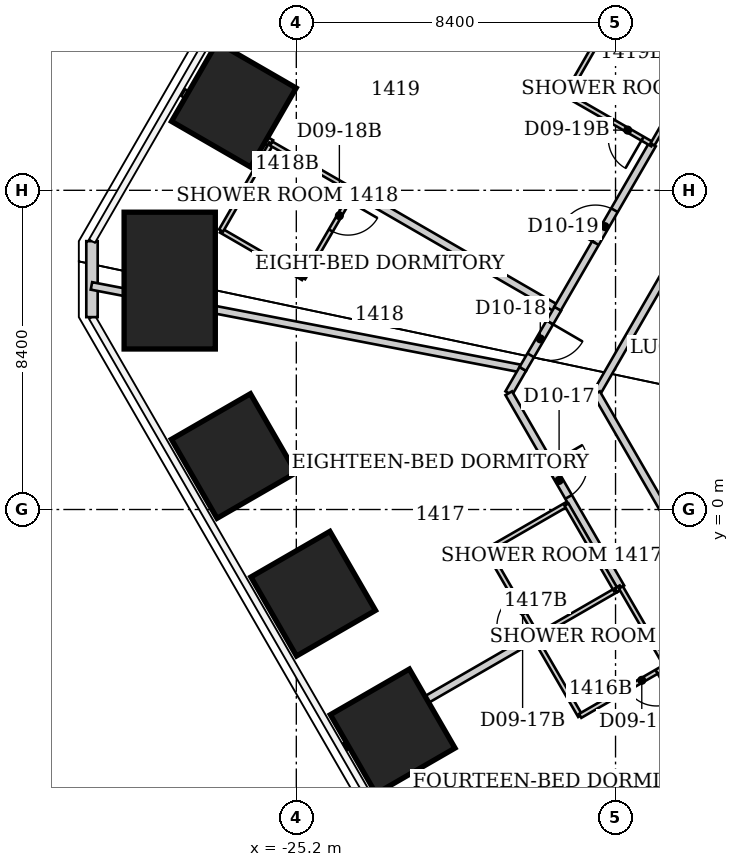
"""IFC4 building model, lengths in metres.
Left out: names, types, materials, properties, quantities, classifications, styles, units other than length and angle.
Written with IfcOpenShell. Run it as: python <this file> out.ifc"""

import sys

from ifc_helpers import new_model, si_unit, direction, frame, frame_2d, origin, origin_2d, place, context, subcontext, project, spatial, rectangle, extrude, element, fill, save


model = new_model("IFC4")
c1 = context("Model", 3, precision=1e-05, world=origin(), true_north=direction((0.0, 1.0)))
c2 = subcontext(c1, "Body", "Model", "MODEL_VIEW")
j1 = project(units=[si_unit("LENGTHUNIT", "METRE"), si_unit("PLANEANGLEUNIT", "RADIAN")], contexts=[c1])
p1 = place(None, origin())
s1 = spatial("IfcSite", under=j1, at=p1, CompositionType="ELEMENT")
p2 = place(p1, origin())
s2 = spatial("IfcBuilding", under=s1, at=p2, CompositionType="ELEMENT")
p3 = place(p2, frame((0.0, 0.0, 61.0)))
s3 = spatial("IfcBuildingStorey", under=s2, at=p3, CompositionType="ELEMENT", Elevation=61.0)
p4 = place(p3, frame((-22.664, -5.839, 0.0), z_axis=(0.036915008746, 0.009501602251, 0.99927323675), x_axis=(-0.865363128074, -0.499798223787, 0.036720458449)))
e1 = element("IfcColumn", 1, at=p4, inside=s3, PredefinedType="COLUMN", context=c2, shape_type="SweptSolid", body=[
    extrude(rectangle(XDim=2.4, YDim=2.4, at=origin_2d()), origin(), (0.0, 0.0, 1.0), 3.803),
])
p5 = place(p3, frame((-24.756, -2.216, 0.0), z_axis=(0.040313871888, 0.003594867557, 0.999180598621), x_axis=(-0.865292276739, -0.499921607788, 0.036710514605)))
e2 = element("IfcColumn", 2, at=p5, inside=s3, PredefinedType="COLUMN", context=c2, shape_type="SweptSolid", body=[
    extrude(rectangle(XDim=2.4, YDim=2.4, at=origin_2d()), origin(), (0.0, 0.0, 1.0), 3.803),
])
p6 = place(p3, frame((-26.847, 1.407, 0.0), z_axis=(0.043710075164, -0.002310664766, 0.9990415858), x_axis=(-0.865223526362, -0.500041450944, 0.036698729792)))
e3 = element("IfcColumn", 3, at=p6, inside=s3, PredefinedType="COLUMN", context=c2, shape_type="SweptSolid", body=[
    extrude(rectangle(XDim=2.4, YDim=2.4, at=origin_2d()), origin(), (0.0, 0.0, 1.0), 3.804),
])
p7 = place(p3, frame((-28.531, 6.024, 0.0), z_axis=(0.046846312306, -0.009882646706, 0.998853220607), x_axis=(-0.998902095057, -0.000629521583, 0.04684237604)))
e4 = element("IfcColumn", 4, at=p7, inside=s3, PredefinedType="COLUMN", context=c2, shape_type="SweptSolid", body=[
    extrude(rectangle(XDim=2.4, YDim=3.6, at=origin_2d()), origin(), (0.0, 0.0, 1.0), 3.804),
])
p8 = place(p3, frame((-26.844, 10.653, 0.0), z_axis=(0.043127320452, -0.017071231012, 0.998923724467), x_axis=(-0.865394297081, 0.498985805563, 0.045889829227)))
e5 = element("IfcColumn", 5, at=p8, inside=s3, PredefinedType="COLUMN", context=c2, shape_type="SweptSolid", body=[
    extrude(rectangle(XDim=2.4, YDim=2.4, at=origin_2d()), origin(), (0.0, 0.0, 1.0), 3.804),
])
p9 = place(p3, frame((-30.576, 5.062, 0.0), z_axis=(0.0, 0.0, 1.0), x_axis=(0.0, 1.0, 0.0)))
e6 = element("IfcWall", 6, at=p9, inside=s3, PredefinedType="SOLIDWALL", context=c2, shape_type="SweptSolid", body=[
    extrude(rectangle(XDim=2.0, YDim=0.3, at=frame_2d((1.0, 0.0))), origin(), (0.0, 0.0, 1.0), 3.64),
])
p10 = place(p3, frame((-30.591, 5.884, 0.0), z_axis=(0.0, 0.0, 1.0), x_axis=(0.981983289605, -0.188967772219, 0.0)))
e7 = element("IfcWall", 7, at=p10, inside=s3, PredefinedType="PARTITIONING", context=c2, shape_type="SweptSolid", body=[
    extrude(rectangle(XDim=11.509, YDim=0.2, at=frame_2d((5.754, 0.0))), origin(), (0.0, 0.0, 1.0), 3.64),
])
p11 = place(p3, frame((-28.176, 10.97, 0.0), z_axis=(0.0, 0.0, 1.0), x_axis=(0.865563676017, -0.500798884543, 0.0)))
e8 = element("IfcWall", 8, at=p11, inside=s3, PredefinedType="PARTITIONING", context=c2, shape_type="SweptSolid", body=[
    extrude(rectangle(XDim=2.676, YDim=0.2, at=frame_2d((1.338, 0.0))), origin(), (0.0, 0.0, 1.0), 3.64),
])
p12 = place(p3, frame((-27.18, 7.34, 0.0), z_axis=(0.0, 0.0, 1.0), x_axis=(0.865508881864, -0.500893576935, 0.0)))
e9 = element("IfcWall", 9, at=p12, inside=s3, PredefinedType="PARTITIONING", context=c2, shape_type="SweptSolid", body=[
    extrude(rectangle(XDim=2.496, YDim=0.12, at=frame_2d((1.248, 0.0))), origin(), (0.0, 0.0, 1.0), 3.64),
])
p13 = place(p3, frame((-25.86, 9.63, 0.0), z_axis=(0.0, 0.0, 1.0), x_axis=(-0.499378545839, -0.866383903334, 0.0)))
e10 = element("IfcWall", 10, at=p13, inside=s3, PredefinedType="PARTITIONING", context=c2, shape_type="SweptSolid", body=[
    extrude(rectangle(XDim=2.643, YDim=0.12, at=frame_2d((1.321, 0.0))), origin(), (0.0, 0.0, 1.0), 3.64),
])
p14 = place(p3, frame((-25.86, 9.63, 0.0), z_axis=(0.0, 0.0, 1.0), x_axis=(0.86653430447, -0.499117520406, 0.0)))
e11 = element("IfcWall", 11, at=p14, inside=s3, PredefinedType="PARTITIONING", context=c2, shape_type="SweptSolid", body=[
    extrude(rectangle(XDim=2.504, YDim=0.12, at=frame_2d((1.252, 0.0))), origin(), (0.0, 0.0, 1.0), 3.64),
])
p15 = place(p3, frame((-25.02, 6.09, 0.0), z_axis=(0.0, 0.0, 1.0), x_axis=(0.502282305835, 0.864703697948, 0.0)))
e12 = element("IfcWall", 12, at=p15, inside=s3, PredefinedType="PARTITIONING", context=c2, shape_type="SweptSolid", body=[
    extrude(rectangle(XDim=2.648, YDim=0.12, at=frame_2d((1.324, 0.0))), origin(), (0.0, 0.0, 1.0), 3.64),
])
p16 = place(p15, frame((1.448, 0.0, 0.0)))
e13 = element("IfcOpeningElement", 13, at=p16, cuts=e12, PredefinedType="OPENING", context=c2, shape_type="SweptSolid", body=[
    extrude(rectangle(XDim=0.9, YDim=2.03, at=frame_2d((0.45, 1.015))), frame((0.0, 0.06, 0.0), z_axis=(0.0, -1.0, 0.0), x_axis=(1.0, 0.0, 0.0)), (0.0, 0.0, 1.0), 0.12),
])
p17 = place(p3, frame((-23.916, -6.24, 0.0), z_axis=(0.0, 0.0, 1.0), x_axis=(0.865919350456, 0.50018364478, 0.0)))
e14 = element("IfcWall", 14, at=p17, inside=s3, PredefinedType="PARTITIONING", context=c2, shape_type="SweptSolid", body=[
    extrude(rectangle(XDim=5.758, YDim=0.2, at=frame_2d((2.879, 0.0))), origin(), (0.0, 0.0, 1.0), 3.64),
])
p18 = place(p3, frame((-23.69, 8.38, 0.0), z_axis=(0.0, 0.0, 1.0), x_axis=(0.865658018331, -0.500635791068, 0.0)))
e15 = element("IfcWall", 15, at=p18, inside=s3, PredefinedType="PARTITIONING", context=c2, shape_type="SweptSolid", body=[
    extrude(rectangle(XDim=6.177, YDim=0.2, at=frame_2d((3.088, 0.0))), origin(), (0.0, 0.0, 1.0), 3.64),
])
p19 = place(p3, frame((-20.17, -1.07, 0.0), z_axis=(0.0, 0.0, 1.0), x_axis=(0.500291685314, -0.865856933682, 0.0)))
e16 = element("IfcWall", 16, at=p19, inside=s3, PredefinedType="PARTITIONING", context=c2, shape_type="SweptSolid", body=[
    extrude(rectangle(XDim=2.599, YDim=0.12, at=frame_2d((1.299, 0.0))), origin(), (0.0, 0.0, 1.0), 3.64),
])
p20 = place(p19, frame((1.399, 0.0, 0.0)))
e17 = element("IfcOpeningElement", 17, at=p20, cuts=e16, PredefinedType="OPENING", context=c2, shape_type="SweptSolid", body=[
    extrude(rectangle(XDim=0.9, YDim=2.03, at=frame_2d((0.45, 1.015))), frame((0.0, 0.06, 0.0), z_axis=(0.0, -1.0, 0.0), x_axis=(1.0, 0.0, 0.0)), (0.0, 0.0, 1.0), 0.12),
])
p21 = place(p3, frame((-19.61, 3.06, 0.0), z_axis=(0.0, 0.0, 1.0), x_axis=(0.50068472101, 0.865629718844, 0.0)))
e18 = element("IfcWall", 18, at=p21, inside=s3, PredefinedType="PARTITIONING", context=c2, shape_type="SweptSolid", body=[
    extrude(rectangle(XDim=0.739, YDim=0.2, at=frame_2d((0.37, 0.0))), origin(), (0.0, 0.0, 1.0), 3.64),
])
p22 = place(p3, frame((-19.61, 3.06, 0.0), z_axis=(0.0, 0.0, 1.0), x_axis=(0.499983910424, -0.866034692906, 0.0)))
e19 = element("IfcWall", 19, at=p22, inside=s3, PredefinedType="PARTITIONING", context=c2, shape_type="SweptSolid", body=[
    extrude(rectangle(XDim=5.901, YDim=0.2, at=frame_2d((2.95, 0.0))), origin(), (0.0, 0.0, 1.0), 3.64),
])
p23 = place(p22, frame((2.15, 0.0, 0.0)))
e20 = element("IfcOpeningElement", 20, at=p23, cuts=e19, PredefinedType="OPENING", context=c2, shape_type="SweptSolid", body=[
    extrude(rectangle(XDim=1.0, YDim=2.13, at=frame_2d((0.5, 1.065))), frame((0.0, 0.1, 0.0), z_axis=(0.0, -1.0, 0.0), x_axis=(1.0, 0.0, 0.0)), (0.0, 0.0, 1.0), 0.2),
])
p24 = place(p3, frame((-18.93, -3.36, 0.0), z_axis=(0.0, 0.0, 1.0), x_axis=(0.501547039172, -0.865130376012, 0.0)))
e21 = element("IfcWall", 21, at=p24, inside=s3, PredefinedType="PARTITIONING", context=c2, shape_type="SweptSolid", body=[
    extrude(rectangle(XDim=2.393, YDim=0.12, at=frame_2d((1.196, 0.0))), origin(), (0.0, 0.0, 1.0), 3.64),
])
p25 = place(p3, frame((-18.868, -3.324, 0.0), z_axis=(0.0, 0.0, 1.0), x_axis=(0.866133109688, 0.499813401482, 0.0)))
e22 = element("IfcWall", 22, at=p25, inside=s3, PredefinedType="PARTITIONING", context=c2, shape_type="SweptSolid", body=[
    extrude(rectangle(XDim=2.401, YDim=0.12, at=frame_2d((1.201, 0.0))), origin(), (0.0, 0.0, 1.0), 3.64),
])
p26 = place(p3, frame((-18.33, 5.28, 0.0), z_axis=(0.0, 0.0, 1.0), x_axis=(0.500685921526, 0.865629024459, 0.0)))
e23 = element("IfcWall", 23, at=p26, inside=s3, PredefinedType="PARTITIONING", context=c2, shape_type="SweptSolid", body=[
    extrude(rectangle(XDim=5.0, YDim=0.2, at=frame_2d((2.5, 0.0))), origin(), (0.0, 0.0, 1.0), 3.64),
])
p27 = place(p26, frame((2.0, 0.0, 0.0)))
e24 = element("IfcOpeningElement", 24, at=p27, cuts=e23, PredefinedType="OPENING", context=c2, shape_type="SweptSolid", body=[
    extrude(rectangle(XDim=1.0, YDim=2.13, at=frame_2d((0.5, 1.065))), frame((0.0, 0.1, 0.0), z_axis=(0.0, -1.0, 0.0), x_axis=(1.0, 0.0, 0.0)), (0.0, 0.0, 1.0), 0.2),
])
p28 = place(p3, frame((-18.32, 5.28, 0.0), z_axis=(0.0, 0.0, 1.0), x_axis=(-0.503140236709, -0.864204780249, 0.0)))
e25 = element("IfcWall", 25, at=p28, inside=s3, PredefinedType="PARTITIONING", context=c2, shape_type="SweptSolid", body=[
    extrude(rectangle(XDim=1.828, YDim=0.2, at=frame_2d((0.914, 0.0))), origin(), (0.0, 0.0, 1.0), 3.64),
])
p29 = place(p28, frame((0.414, 0.0, 0.0)))
e26 = element("IfcOpeningElement", 26, at=p29, cuts=e25, PredefinedType="OPENING", context=c2, shape_type="SweptSolid", body=[
    extrude(rectangle(XDim=1.0, YDim=2.13, at=frame_2d((0.5, 1.065))), frame((0.0, 0.1, 0.0), z_axis=(0.0, -1.0, 0.0), x_axis=(1.0, 0.0, 0.0)), (0.0, 0.0, 1.0), 0.2),
])
p30 = place(p3, frame((-18.09, 0.13, 0.0), z_axis=(0.0, 0.0, 1.0), x_axis=(-0.866177122335, -0.499737123639, 0.0)))
e27 = element("IfcWall", 27, at=p30, inside=s3, PredefinedType="PARTITIONING", context=c2, shape_type="SweptSolid", body=[
    extrude(rectangle(XDim=2.401, YDim=0.12, at=frame_2d((1.201, 0.0))), origin(), (0.0, 0.0, 1.0), 3.64),
])
p31 = place(p3, frame((-18.09, 10.91, 0.0), z_axis=(0.0, 0.0, 1.0), x_axis=(0.866856728041, -0.498557331759, 0.0)))
e28 = element("IfcWall", 28, at=p31, inside=s3, PredefinedType="PARTITIONING", context=c2, shape_type="SweptSolid", body=[
    extrude(rectangle(XDim=2.607, YDim=0.12, at=frame_2d((1.304, 0.0))), origin(), (0.0, 0.0, 1.0), 3.64),
])
p32 = place(p31, frame((1.407, 0.0, 0.0)))
e29 = element("IfcOpeningElement", 29, at=p32, cuts=e28, PredefinedType="OPENING", context=c2, shape_type="SweptSolid", body=[
    extrude(rectangle(XDim=0.9, YDim=2.03, at=frame_2d((0.45, 1.015))), frame((0.0, 0.06, 0.0), z_axis=(0.0, -1.0, 0.0), x_axis=(1.0, 0.0, 0.0)), (0.0, 0.0, 1.0), 0.12),
])
p33 = place(p3, frame((-17.73, -5.43, 0.0), z_axis=(0.0, 0.0, 1.0), x_axis=(0.866114241029, 0.499846097802, 0.0)))
e30 = element("IfcWall", 30, at=p33, inside=s3, PredefinedType="PARTITIONING", context=c2, shape_type="SweptSolid", body=[
    extrude(rectangle(XDim=2.621, YDim=0.12, at=frame_2d((1.311, 0.0))), origin(), (0.0, 0.0, 1.0), 2.878),
])
p34 = place(p33, frame((1.421, 0.0, 0.0)))
e31 = element("IfcOpeningElement", 31, at=p34, cuts=e30, PredefinedType="OPENING", context=c2, shape_type="SweptSolid", body=[
    extrude(rectangle(XDim=0.9, YDim=2.03, at=frame_2d((0.45, 1.015))), frame((0.0, 0.06, 0.0), z_axis=(0.0, -1.0, 0.0), x_axis=(1.0, 0.0, 0.0)), (0.0, 0.0, 1.0), 0.12),
])
p35 = place(p3, frame((-17.3, 3.06, 0.0), z_axis=(0.0, 0.0, 1.0), x_axis=(0.499704269421, 0.866196076603, 0.0)))
e32 = element("IfcWall", 32, at=p35, inside=s3, PredefinedType="PARTITIONING", context=c2, shape_type="SweptSolid", body=[
    extrude(rectangle(XDim=9.686, YDim=0.2, at=frame_2d((4.843, 0.0))), origin(), (0.0, 0.0, 1.0), 3.64),
])
p36 = place(p3, frame((-16.89, 13.0, 0.0), z_axis=(0.0, 0.0, 1.0), x_axis=(-0.497970509195, -0.867193964446, 0.0)))
e33 = element("IfcWall", 33, at=p36, inside=s3, PredefinedType="PARTITIONING", context=c2, shape_type="SweptSolid", body=[
    extrude(rectangle(XDim=2.41, YDim=0.12, at=frame_2d((1.205, 0.0))), origin(), (0.0, 0.0, 1.0), 3.64),
])
p37 = place(p3, frame((-16.79, -2.12, 0.0), z_axis=(0.0, 0.0, 1.0), x_axis=(-0.50025099007, 0.865880446098, 0.0)))
e34 = element("IfcWall", 34, at=p37, inside=s3, PredefinedType="PARTITIONING", context=c2, shape_type="SweptSolid", body=[
    extrude(rectangle(XDim=2.599, YDim=0.12, at=frame_2d((1.299, 0.0))), origin(), (0.0, 0.0, 1.0), 3.64),
])
p38 = place(p3, frame((-16.788, -2.124, 0.0), z_axis=(0.0, 0.0, 1.0), x_axis=(0.866405716731, 0.499340699338, 0.0)))
e35 = element("IfcWall", 35, at=p38, inside=s3, PredefinedType="PARTITIONING", context=c2, shape_type="SweptSolid", body=[
    extrude(rectangle(XDim=0.148, YDim=0.12, at=frame_2d((0.074, 0.0))), origin(), (0.0, 0.0, 1.0), 3.64),
])
p39 = place(p3, frame((-16.66, -2.05, 0.0), z_axis=(0.0, 0.0, 1.0), x_axis=(0.501502765098, -0.865156041763, 0.0)))
e36 = element("IfcWall", 36, at=p39, inside=s3, PredefinedType="PARTITIONING", context=c2, shape_type="SweptSolid", body=[
    extrude(rectangle(XDim=2.393, YDim=0.12, at=frame_2d((1.196, 0.0))), origin(), (0.0, 0.0, 1.0), 3.64),
])
p40 = place(p3, frame((-15.827, 9.608, 0.0), z_axis=(0.0, 0.0, 1.0), x_axis=(0.499737123639, 0.866177122335, 0.0)))
e37 = element("IfcWall", 37, at=p40, inside=s3, PredefinedType="PARTITIONING", context=c2, shape_type="SweptSolid", body=[
    extrude(rectangle(XDim=2.401, YDim=0.12, at=frame_2d((1.201, 0.0))), origin(), (0.0, 0.0, 1.0), 3.64),
])
p41 = place(p3, frame((-11.16, -7.57, 0.0), z_axis=(0.0, 0.0, 1.0), x_axis=(-0.500175206663, 0.865924224537, 0.0)))
e38 = element("IfcWall", 38, at=p41, inside=s3, PredefinedType="PARTITIONING", context=c2, shape_type="SweptSolid", body=[
    extrude(rectangle(XDim=12.275, YDim=0.2, at=frame_2d((6.138, 0.0))), origin(), (0.0, 0.0, 1.0), 3.64),
])
p42 = place(p34, origin())
e39 = element("IfcDoor", 39, at=p42, inside=s3, OperationType="SINGLE_SWING_RIGHT", PredefinedType="DOOR", context=c2, shape_type="SweptSolid", body=[
    extrude(rectangle(XDim=0.9, YDim=2.03, at=frame_2d((0.45, 1.015))), frame((0.0, 0.025, 0.0), z_axis=(0.0, -1.0, 0.0), x_axis=(1.0, 0.0, 0.0)), (0.0, 0.0, 1.0), 0.05),
])
fill(e31, e39)
p43 = place(p23, origin())
e40 = element("IfcDoor", 40, at=p43, inside=s3, OperationType="SINGLE_SWING_LEFT", PredefinedType="DOOR", context=c2, shape_type="SweptSolid", body=[
    extrude(rectangle(XDim=1.0, YDim=2.13, at=frame_2d((0.5, 1.065))), frame((0.0, 0.025, 0.0), z_axis=(0.0, -1.0, 0.0), x_axis=(1.0, 0.0, 0.0)), (0.0, 0.0, 1.0), 0.05),
])
fill(e20, e40)
p44 = place(p20, origin())
e41 = element("IfcDoor", 41, at=p44, inside=s3, OperationType="SINGLE_SWING_RIGHT", PredefinedType="DOOR", context=c2, shape_type="SweptSolid", body=[
    extrude(rectangle(XDim=0.9, YDim=2.03, at=frame_2d((0.45, 1.015))), frame((0.0, 0.025, 0.0), z_axis=(0.0, -1.0, 0.0), x_axis=(1.0, 0.0, 0.0)), (0.0, 0.0, 1.0), 0.05),
])
fill(e17, e41)
p45 = place(p29, origin())
e42 = element("IfcDoor", 42, at=p45, inside=s3, OperationType="SINGLE_SWING_LEFT", PredefinedType="DOOR", context=c2, shape_type="SweptSolid", body=[
    extrude(rectangle(XDim=1.0, YDim=2.13, at=frame_2d((0.5, 1.065))), frame((0.0, 0.025, 0.0), z_axis=(0.0, -1.0, 0.0), x_axis=(1.0, 0.0, 0.0)), (0.0, 0.0, 1.0), 0.05),
])
fill(e26, e42)
p46 = place(p16, origin())
e43 = element("IfcDoor", 43, at=p46, inside=s3, OperationType="SINGLE_SWING_RIGHT", PredefinedType="DOOR", context=c2, shape_type="SweptSolid", body=[
    extrude(rectangle(XDim=0.9, YDim=2.03, at=frame_2d((0.45, 1.015))), frame((0.0, 0.025, 0.0), z_axis=(0.0, -1.0, 0.0), x_axis=(1.0, 0.0, 0.0)), (0.0, 0.0, 1.0), 0.05),
])
fill(e13, e43)
p47 = place(p27, origin())
e44 = element("IfcDoor", 44, at=p47, inside=s3, OperationType="SINGLE_SWING_LEFT", PredefinedType="DOOR", context=c2, shape_type="SweptSolid", body=[
    extrude(rectangle(XDim=1.0, YDim=2.13, at=frame_2d((0.5, 1.065))), frame((0.0, 0.025, 0.0), z_axis=(0.0, -1.0, 0.0), x_axis=(1.0, 0.0, 0.0)), (0.0, 0.0, 1.0), 0.05),
])
fill(e24, e44)
p48 = place(p32, origin())
e45 = element("IfcDoor", 45, at=p48, inside=s3, OperationType="SINGLE_SWING_RIGHT", PredefinedType="DOOR", context=c2, shape_type="SweptSolid", body=[
    extrude(rectangle(XDim=0.9, YDim=2.03, at=frame_2d((0.45, 1.015))), frame((0.0, 0.025, 0.0), z_axis=(0.0, -1.0, 0.0), x_axis=(1.0, 0.0, 0.0)), (0.0, 0.0, 1.0), 0.05),
])
fill(e29, e45)
save(model, sys.argv[1])
